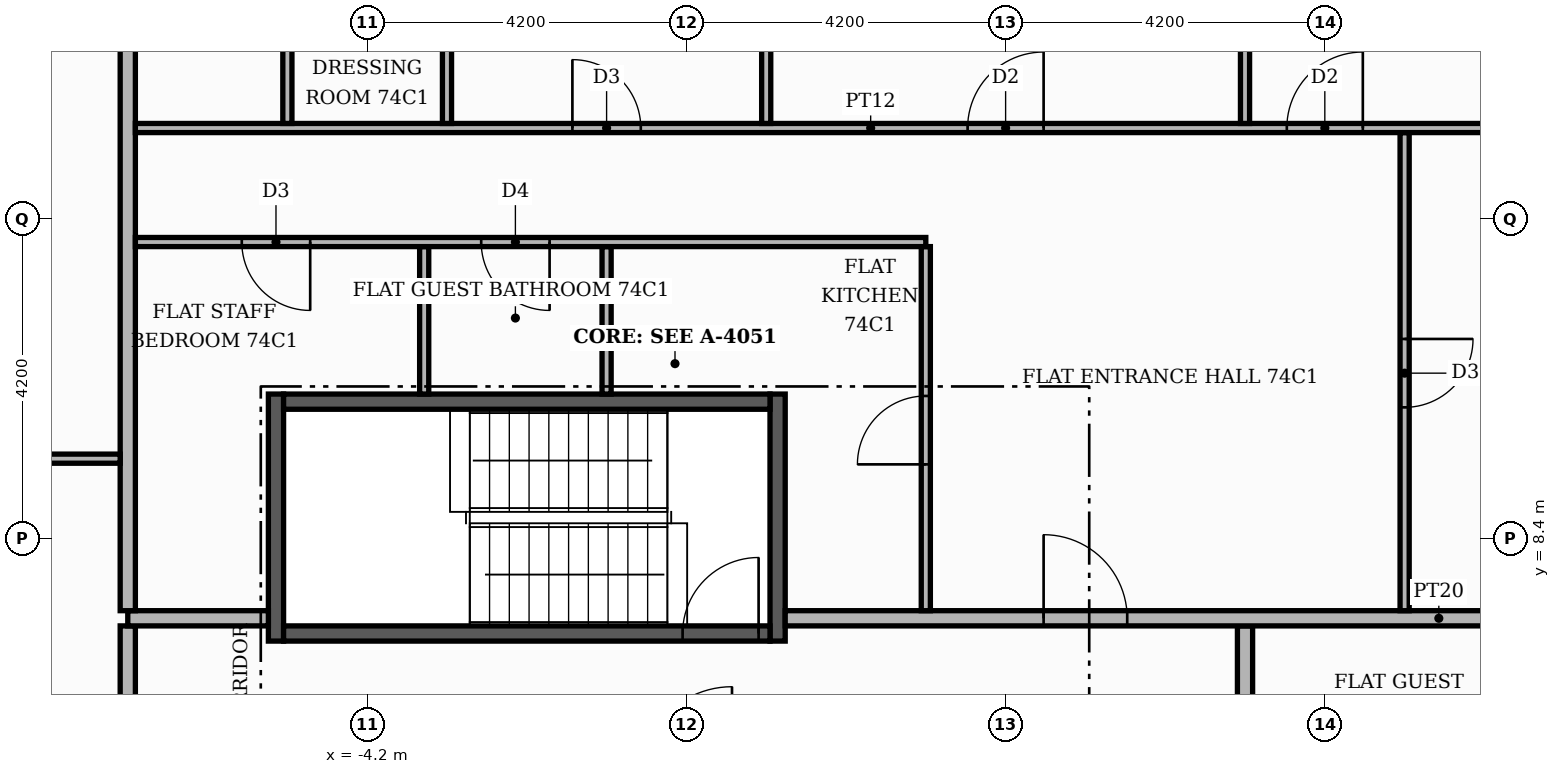
"""IFC4 building model, lengths in metres.
Left out: names, types, materials, properties, quantities, classifications, styles, units other than length and angle.
Written with IfcOpenShell. Run it as: python <this file> out.ifc"""

import sys

from ifc_helpers import new_model, si_unit, direction, frame, frame_2d, origin, place, context, subcontext, project, spatial, rectangle, extrude, element, fill, save


model = new_model("IFC4")
c1 = context("Model", 3, precision=1e-05, world=origin(), true_north=direction((0.0, 1.0)))
c2 = subcontext(c1, "Body", "Model", "MODEL_VIEW")
j1 = project(units=[si_unit("LENGTHUNIT", "METRE"), si_unit("PLANEANGLEUNIT", "RADIAN")], contexts=[c1])
p1 = place(None, origin())
s1 = spatial("IfcSite", under=j1, at=p1, CompositionType="ELEMENT")
p2 = place(p1, origin())
s2 = spatial("IfcBuilding", under=s1, at=p2, CompositionType="ELEMENT")
p3 = place(p2, frame((0.0, 0.0, 308.4)))
s3 = spatial("IfcBuildingStorey", under=s2, at=p3, CompositionType="ELEMENT", Elevation=308.4)
for number, where, z_axis, x_axis in (
    (1, (-5.4, 7.05, 0.0), (0.0, 0.0, 1.0), (0.0, 1.0, 0.0)),
    (2, (1.2, 7.05, 0.0), (0.0, 0.0, 1.0), (0.0, 1.0, 0.0)),
):
    element("IfcWall", number, at=place(p3, frame(where, z_axis=z_axis, x_axis=x_axis)), inside=s3, PredefinedType="SHEAR", context=c2, shape_type="SweptSolid", body=[
        extrude(rectangle(XDim=3.25, YDim=0.2, at=frame_2d((1.625, 0.0))), origin(), (0.0, 0.0, 1.0), 3.55),
    ])
p4 = place(p3, frame((-5.3, 7.15, 0.0), z_axis=(0.0, 0.0, 1.0), x_axis=(1.0, 0.0, 0.0)))
e3 = element("IfcWall", 3, at=p4, inside=s3, PredefinedType="SHEAR", context=c2, shape_type="SweptSolid", body=[
    extrude(rectangle(XDim=6.4, YDim=0.2, at=frame_2d((3.2, 0.0))), origin(), (0.0, 0.0, 1.0), 3.55),
])
p5 = place(p4, frame((5.25, 0.0, 0.0)))
e4 = element("IfcOpeningElement", 4, at=p5, cuts=e3, PredefinedType="OPENING", context=c2, shape_type="SweptSolid", body=[
    extrude(rectangle(XDim=1.0, YDim=2.1, at=frame_2d((0.5, 1.05))), frame((0.0, 0.11, 0.0), z_axis=(0.0, -1.0, 0.0), x_axis=(1.0, 0.0, 0.0)), (0.0, 0.0, 1.0), 0.22),
])
p6 = place(p3, frame((-5.3, 10.2, 0.0), z_axis=(0.0, 0.0, 1.0), x_axis=(1.0, 0.0, 0.0)))
e5 = element("IfcWall", 5, at=p6, inside=s3, PredefinedType="SHEAR", context=c2, shape_type="SweptSolid", body=[
    extrude(rectangle(XDim=6.4, YDim=0.2, at=frame_2d((3.2, 0.0))), origin(), (0.0, 0.0, 1.0), 3.55),
])
p7 = place(p3, frame((-7.35, -7.25, 0.0), z_axis=(0.0, 0.0, 1.0), x_axis=(0.0, 1.0, 0.0)))
e6 = element("IfcWall", 6, at=p7, inside=s3, PredefinedType="PARTITIONING", context=c2, shape_type="SweptSolid", body=[
    extrude(rectangle(XDim=14.5, YDim=0.2, at=frame_2d((7.25, 0.0))), origin(), (0.0, 0.0, 1.0), 3.55),
])
p8 = place(p7, frame((11.95, 0.0, 0.0)))
e7 = element("IfcOpeningElement", 7, at=p8, cuts=e6, PredefinedType="OPENING", context=c2, shape_type="SweptSolid", body=[
    extrude(rectangle(XDim=1.1, YDim=2.4, at=frame_2d((0.55, 1.2))), frame((0.0, 0.11, 0.0), z_axis=(0.0, -1.0, 0.0), x_axis=(1.0, 0.0, 0.0)), (0.0, 0.0, 1.0), 0.22),
])
p9 = place(p3, frame((7.35, -7.25, 0.0), z_axis=(0.0, 0.0, 1.0), x_axis=(0.0, 1.0, 0.0)))
e8 = element("IfcWall", 8, at=p9, inside=s3, PredefinedType="PARTITIONING", context=c2, shape_type="SweptSolid", body=[
    extrude(rectangle(XDim=14.5, YDim=0.2, at=frame_2d((7.25, 0.0))), origin(), (0.0, 0.0, 1.0), 3.55),
])
p10 = place(p9, frame((2.5, 0.0, 0.0)))
e9 = element("IfcOpeningElement", 9, at=p10, cuts=e8, PredefinedType="OPENING", context=c2, shape_type="SweptSolid", body=[
    extrude(rectangle(XDim=1.1, YDim=2.4, at=frame_2d((0.55, 1.2))), frame((0.0, 0.11, 0.0), z_axis=(0.0, -1.0, 0.0), x_axis=(1.0, 0.0, 0.0)), (0.0, 0.0, 1.0), 0.22),
])
p11 = place(p3, frame((-7.35, 7.35, 0.0), z_axis=(0.0, 0.0, 1.0), x_axis=(1.0, 0.0, 0.0)))
e10 = element("IfcWall", 10, at=p11, inside=s3, PredefinedType="PARTITIONING", context=c2, shape_type="SweptSolid", body=[
    extrude(rectangle(XDim=1.85, YDim=0.2, at=frame_2d((0.925, 0.0))), origin(), (0.0, 0.0, 1.0), 3.55),
])
p12 = place(p3, frame((1.3, 7.35, 0.0), z_axis=(0.0, 0.0, 1.0), x_axis=(1.0, 0.0, 0.0)))
e11 = element("IfcWall", 11, at=p12, inside=s3, PredefinedType="PARTITIONING", context=c2, shape_type="SweptSolid", body=[
    extrude(rectangle(XDim=17.2, YDim=0.2, at=frame_2d((8.6, 0.0))), origin(), (0.0, 0.0, 1.0), 3.55),
])
p13 = place(p12, frame((3.4, 0.0, 0.0)))
e12 = element("IfcOpeningElement", 12, at=p13, cuts=e11, PredefinedType="OPENING", context=c2, shape_type="SweptSolid", body=[
    extrude(rectangle(XDim=1.1, YDim=2.4, at=frame_2d((0.55, 1.2))), frame((0.0, 0.11, 0.0), z_axis=(0.0, -1.0, 0.0), x_axis=(1.0, 0.0, 0.0)), (0.0, 0.0, 1.0), 0.22),
])
p14 = place(p3, frame((-7.35, 7.45, 0.0), z_axis=(0.0, 0.0, 1.0), x_axis=(0.0, 1.0, 0.0)))
e13 = element("IfcWall", 13, at=p14, inside=s3, PredefinedType="PARTITIONING", context=c2, shape_type="SweptSolid", body=[
    extrude(rectangle(XDim=11.05, YDim=0.2, at=frame_2d((5.525, 0.0))), origin(), (0.0, 0.0, 1.0), 3.55),
])
p15 = place(p3, frame((3.15, 7.45, 0.0), z_axis=(0.0, 0.0, 1.0), x_axis=(0.0, 1.0, 0.0)))
e14 = element("IfcWall", 14, at=p15, inside=s3, PredefinedType="PARTITIONING", context=c2, shape_type="SweptSolid", body=[
    extrude(rectangle(XDim=4.79, YDim=0.12, at=frame_2d((2.395, 0.0))), origin(), (0.0, 0.0, 1.0), 3.55),
])
p16 = place(p15, frame((1.925, 0.0, 0.0)))
e15 = element("IfcOpeningElement", 15, at=p16, cuts=e14, PredefinedType="OPENING", context=c2, shape_type="SweptSolid", body=[
    extrude(rectangle(XDim=0.9, YDim=2.1, at=frame_2d((0.45, 1.05))), frame((0.0, 0.07, 0.0), z_axis=(0.0, -1.0, 0.0), x_axis=(1.0, 0.0, 0.0)), (0.0, 0.0, 1.0), 0.14),
])
p17 = place(p3, frame((9.45, 7.45, 0.0), z_axis=(0.0, 0.0, 1.0), x_axis=(0.0, 1.0, 0.0)))
e16 = element("IfcWall", 16, at=p17, inside=s3, PredefinedType="PARTITIONING", context=c2, shape_type="SweptSolid", body=[
    extrude(rectangle(XDim=6.29, YDim=0.12, at=frame_2d((3.145, 0.0))), origin(), (0.0, 0.0, 1.0), 3.55),
])
p18 = place(p17, frame((2.675, 0.0, 0.0)))
e17 = element("IfcOpeningElement", 17, at=p18, cuts=e16, PredefinedType="OPENING", context=c2, shape_type="SweptSolid", body=[
    extrude(rectangle(XDim=0.9, YDim=2.1, at=frame_2d((0.45, 1.05))), frame((0.0, 0.07, 0.0), z_axis=(0.0, -1.0, 0.0), x_axis=(1.0, 0.0, 0.0)), (0.0, 0.0, 1.0), 0.14),
])
p19 = place(p3, frame((-13.2, 9.45, 0.0), z_axis=(0.0, 0.0, 1.0), x_axis=(1.0, 0.0, 0.0)))
e18 = element("IfcWall", 18, at=p19, inside=s3, PredefinedType="PARTITIONING", context=c2, shape_type="SweptSolid", body=[
    extrude(rectangle(XDim=5.75, YDim=0.12, at=frame_2d((2.875, 0.0))), origin(), (0.0, 0.0, 1.0), 3.55),
])
p20 = place(p19, frame((2.425, 0.0, 0.0)))
e19 = element("IfcOpeningElement", 19, at=p20, cuts=e18, PredefinedType="OPENING", context=c2, shape_type="SweptSolid", body=[
    extrude(rectangle(XDim=1.0, YDim=2.1, at=frame_2d((0.5, 1.05))), frame((0.0, 0.07, 0.0), z_axis=(0.0, -1.0, 0.0), x_axis=(1.0, 0.0, 0.0)), (0.0, 0.0, 1.0), 0.14),
])
for number, where, z_axis, x_axis in (
    (20, (-3.45, 10.3, 0.0), (0.0, 0.0, 1.0), (0.0, 1.0, 0.0)),
    (21, (-1.05, 10.3, 0.0), (0.0, 0.0, 1.0), (0.0, 1.0, 0.0)),
):
    element("IfcWall", number, at=place(p3, frame(where, z_axis=z_axis, x_axis=x_axis)), inside=s3, PredefinedType="PARTITIONING", context=c2, shape_type="SweptSolid", body=[
        extrude(rectangle(XDim=1.94, YDim=0.12, at=frame_2d((0.97, 0.0))), origin(), (0.0, 0.0, 1.0), 3.55),
    ])
p21 = place(p3, frame((-7.25, 12.3, 0.0), z_axis=(0.0, 0.0, 1.0), x_axis=(1.0, 0.0, 0.0)))
e22 = element("IfcWall", 22, at=p21, inside=s3, PredefinedType="PARTITIONING", context=c2, shape_type="SweptSolid", body=[
    extrude(rectangle(XDim=10.4, YDim=0.12, at=frame_2d((5.2, 0.0))), origin(), (0.0, 0.0, 1.0), 3.55),
])
p22 = place(p21, frame((4.55, 0.0, 0.0)))
e23 = element("IfcOpeningElement", 23, at=p22, cuts=e22, PredefinedType="OPENING", context=c2, shape_type="SweptSolid", body=[
    extrude(rectangle(XDim=0.9, YDim=2.1, at=frame_2d((0.45, 1.05))), frame((0.0, 0.07, 0.0), z_axis=(0.0, -1.0, 0.0), x_axis=(1.0, 0.0, 0.0)), (0.0, 0.0, 1.0), 0.14),
])
p23 = place(p21, frame((1.4, 0.0, 0.0)))
e24 = element("IfcOpeningElement", 24, at=p23, cuts=e22, PredefinedType="OPENING", context=c2, shape_type="SweptSolid", body=[
    extrude(rectangle(XDim=0.9, YDim=2.1, at=frame_2d((0.45, 1.05))), frame((0.0, 0.07, 0.0), z_axis=(0.0, -1.0, 0.0), x_axis=(1.0, 0.0, 0.0)), (0.0, 0.0, 1.0), 0.14),
])
p24 = place(p3, frame((-7.25, 13.8, 0.0), z_axis=(0.0, 0.0, 1.0), x_axis=(1.0, 0.0, 0.0)))
e25 = element("IfcWall", 25, at=p24, inside=s3, PredefinedType="PARTITIONING", context=c2, shape_type="SweptSolid", body=[
    extrude(rectangle(XDim=19.349, YDim=0.12, at=frame_2d((9.675, 0.0))), origin(), (0.0, 0.0, 1.0), 3.55),
])
p25 = place(p24, frame((15.15, 0.0, 0.0)))
e26 = element("IfcOpeningElement", 26, at=p25, cuts=e25, PredefinedType="OPENING", context=c2, shape_type="SweptSolid", body=[
    extrude(rectangle(XDim=1.0, YDim=2.1, at=frame_2d((0.5, 1.05))), frame((0.0, 0.07, 0.0), z_axis=(0.0, -1.0, 0.0), x_axis=(1.0, 0.0, 0.0)), (0.0, 0.0, 1.0), 0.14),
])
p26 = place(p24, frame((10.95, 0.0, 0.0)))
e27 = element("IfcOpeningElement", 27, at=p26, cuts=e25, PredefinedType="OPENING", context=c2, shape_type="SweptSolid", body=[
    extrude(rectangle(XDim=1.0, YDim=2.1, at=frame_2d((0.5, 1.05))), frame((0.0, 0.07, 0.0), z_axis=(0.0, -1.0, 0.0), x_axis=(1.0, 0.0, 0.0)), (0.0, 0.0, 1.0), 0.14),
])
p27 = place(p24, frame((5.75, 0.0, 0.0)))
e28 = element("IfcOpeningElement", 28, at=p27, cuts=e25, PredefinedType="OPENING", context=c2, shape_type="SweptSolid", body=[
    extrude(rectangle(XDim=0.9, YDim=2.1, at=frame_2d((0.45, 1.05))), frame((0.0, 0.07, 0.0), z_axis=(0.0, -1.0, 0.0), x_axis=(1.0, 0.0, 0.0)), (0.0, 0.0, 1.0), 0.14),
])
p28 = place(p3, frame((-5.25, 13.86, 0.0), z_axis=(0.0, 0.0, 1.0), x_axis=(0.0, 1.0, 0.0)))
e29 = element("IfcWall", 29, at=p28, inside=s3, PredefinedType="PARTITIONING", context=c2, shape_type="SweptSolid", body=[
    extrude(rectangle(XDim=4.64, YDim=0.12, at=frame_2d((2.32, 0.0))), origin(), (0.0, 0.0, 1.0), 3.55),
])
p29 = place(p28, frame((1.99, 0.0, 0.0)))
e30 = element("IfcOpeningElement", 30, at=p29, cuts=e29, PredefinedType="OPENING", context=c2, shape_type="SweptSolid", body=[
    extrude(rectangle(XDim=0.9, YDim=2.1, at=frame_2d((0.45, 1.05))), frame((0.0, 0.07, 0.0), z_axis=(0.0, -1.0, 0.0), x_axis=(1.0, 0.0, 0.0)), (0.0, 0.0, 1.0), 0.14),
])
p30 = place(p3, frame((-3.15, 13.86, 0.0), z_axis=(0.0, 0.0, 1.0), x_axis=(0.0, 1.0, 0.0)))
e31 = element("IfcWall", 31, at=p30, inside=s3, PredefinedType="PARTITIONING", context=c2, shape_type="SweptSolid", body=[
    extrude(rectangle(XDim=4.64, YDim=0.12, at=frame_2d((2.32, 0.0))), origin(), (0.0, 0.0, 1.0), 3.55),
])
p31 = place(p30, frame((1.99, 0.0, 0.0)))
e32 = element("IfcOpeningElement", 32, at=p31, cuts=e31, PredefinedType="OPENING", context=c2, shape_type="SweptSolid", body=[
    extrude(rectangle(XDim=0.9, YDim=2.1, at=frame_2d((0.45, 1.05))), frame((0.0, 0.07, 0.0), z_axis=(0.0, -1.0, 0.0), x_axis=(1.0, 0.0, 0.0)), (0.0, 0.0, 1.0), 0.14),
])
p32 = place(p3, frame((1.05, 13.86, 0.0), z_axis=(0.0, 0.0, 1.0), x_axis=(0.0, 1.0, 0.0)))
e33 = element("IfcWall", 33, at=p32, inside=s3, PredefinedType="PARTITIONING", context=c2, shape_type="SweptSolid", body=[
    extrude(rectangle(XDim=3.029, YDim=0.12, at=frame_2d((1.514, 0.0))), origin(), (0.0, 0.0, 1.0), 3.55),
])
p33 = place(p3, frame((7.35, 13.86, 0.0), z_axis=(0.0, 0.0, 1.0), x_axis=(0.0, 1.0, 0.0)))
e34 = element("IfcWall", 34, at=p33, inside=s3, PredefinedType="PARTITIONING", context=c2, shape_type="SweptSolid", body=[
    extrude(rectangle(XDim=4.64, YDim=0.12, at=frame_2d((2.32, 0.0))), origin(), (0.0, 0.0, 1.0), 3.55),
])
p34 = place(p5, origin())
e35 = element("IfcDoor", 35, at=p34, inside=s3, OperationType="SINGLE_SWING_RIGHT", PredefinedType="DOOR", context=c2, shape_type="SweptSolid", body=[
    extrude(rectangle(XDim=1.0, YDim=2.1, at=frame_2d((0.5, 1.05))), frame((0.0, 0.025, 0.0), z_axis=(0.0, -1.0, 0.0), x_axis=(1.0, 0.0, 0.0)), (0.0, 0.0, 1.0), 0.05),
])
fill(e4, e35)
p35 = place(p13, origin())
e36 = element("IfcDoor", 36, at=p35, inside=s3, OperationType="SINGLE_SWING_LEFT", PredefinedType="DOOR", context=c2, shape_type="SweptSolid", body=[
    extrude(rectangle(XDim=1.1, YDim=2.4, at=frame_2d((0.55, 1.2))), frame((0.0, 0.025, 0.0), z_axis=(0.0, -1.0, 0.0), x_axis=(1.0, 0.0, 0.0)), (0.0, 0.0, 1.0), 0.05),
])
fill(e12, e36)
p36 = place(p18, frame((0.9, 0.0, 0.0), z_axis=(0.0, 0.0, 1.0), x_axis=(-1.0, 0.0, 0.0)))
e37 = element("IfcDoor", 37, at=p36, inside=s3, OperationType="SINGLE_SWING_RIGHT", PredefinedType="DOOR", context=c2, shape_type="SweptSolid", body=[
    extrude(rectangle(XDim=0.9, YDim=2.1, at=frame_2d((0.45, 1.05))), frame((0.0, 0.025, 0.0), z_axis=(0.0, -1.0, 0.0), x_axis=(1.0, 0.0, 0.0)), (0.0, 0.0, 1.0), 0.05),
])
fill(e17, e37)
p37 = place(p16, origin())
e38 = element("IfcDoor", 38, at=p37, inside=s3, OperationType="SINGLE_SWING_LEFT", PredefinedType="DOOR", context=c2, shape_type="SweptSolid", body=[
    extrude(rectangle(XDim=0.9, YDim=2.1, at=frame_2d((0.45, 1.05))), frame((0.0, 0.025, 0.0), z_axis=(0.0, -1.0, 0.0), x_axis=(1.0, 0.0, 0.0)), (0.0, 0.0, 1.0), 0.05),
])
fill(e15, e38)
p38 = place(p22, frame((0.9, 0.0, 0.0), z_axis=(0.0, 0.0, 1.0), x_axis=(-1.0, 0.0, 0.0)))
e39 = element("IfcDoor", 39, at=p38, inside=s3, OperationType="SINGLE_SWING_RIGHT", PredefinedType="DOOR", context=c2, shape_type="SweptSolid", body=[
    extrude(rectangle(XDim=0.9, YDim=2.1, at=frame_2d((0.45, 1.05))), frame((0.0, 0.025, 0.0), z_axis=(0.0, -1.0, 0.0), x_axis=(1.0, 0.0, 0.0)), (0.0, 0.0, 1.0), 0.05),
])
fill(e23, e39)
p39 = place(p23, frame((0.9, 0.0, 0.0), z_axis=(0.0, 0.0, 1.0), x_axis=(-1.0, 0.0, 0.0)))
e40 = element("IfcDoor", 40, at=p39, inside=s3, OperationType="SINGLE_SWING_RIGHT", PredefinedType="DOOR", context=c2, shape_type="SweptSolid", body=[
    extrude(rectangle(XDim=0.9, YDim=2.1, at=frame_2d((0.45, 1.05))), frame((0.0, 0.025, 0.0), z_axis=(0.0, -1.0, 0.0), x_axis=(1.0, 0.0, 0.0)), (0.0, 0.0, 1.0), 0.05),
])
fill(e24, e40)
p40 = place(p25, origin())
e41 = element("IfcDoor", 41, at=p40, inside=s3, OperationType="SINGLE_SWING_RIGHT", PredefinedType="DOOR", context=c2, shape_type="SweptSolid", body=[
    extrude(rectangle(XDim=1.0, YDim=2.1, at=frame_2d((0.5, 1.05))), frame((0.0, 0.025, 0.0), z_axis=(0.0, -1.0, 0.0), x_axis=(1.0, 0.0, 0.0)), (0.0, 0.0, 1.0), 0.05),
])
fill(e26, e41)
p41 = place(p26, origin())
e42 = element("IfcDoor", 42, at=p41, inside=s3, OperationType="SINGLE_SWING_RIGHT", PredefinedType="DOOR", context=c2, shape_type="SweptSolid", body=[
    extrude(rectangle(XDim=1.0, YDim=2.1, at=frame_2d((0.5, 1.05))), frame((0.0, 0.025, 0.0), z_axis=(0.0, -1.0, 0.0), x_axis=(1.0, 0.0, 0.0)), (0.0, 0.0, 1.0), 0.05),
])
fill(e27, e42)
p42 = place(p27, origin())
e43 = element("IfcDoor", 43, at=p42, inside=s3, OperationType="SINGLE_SWING_LEFT", PredefinedType="DOOR", context=c2, shape_type="SweptSolid", body=[
    extrude(rectangle(XDim=0.9, YDim=2.1, at=frame_2d((0.45, 1.05))), frame((0.0, 0.025, 0.0), z_axis=(0.0, -1.0, 0.0), x_axis=(1.0, 0.0, 0.0)), (0.0, 0.0, 1.0), 0.05),
])
fill(e28, e43)
save(model, sys.argv[1])
